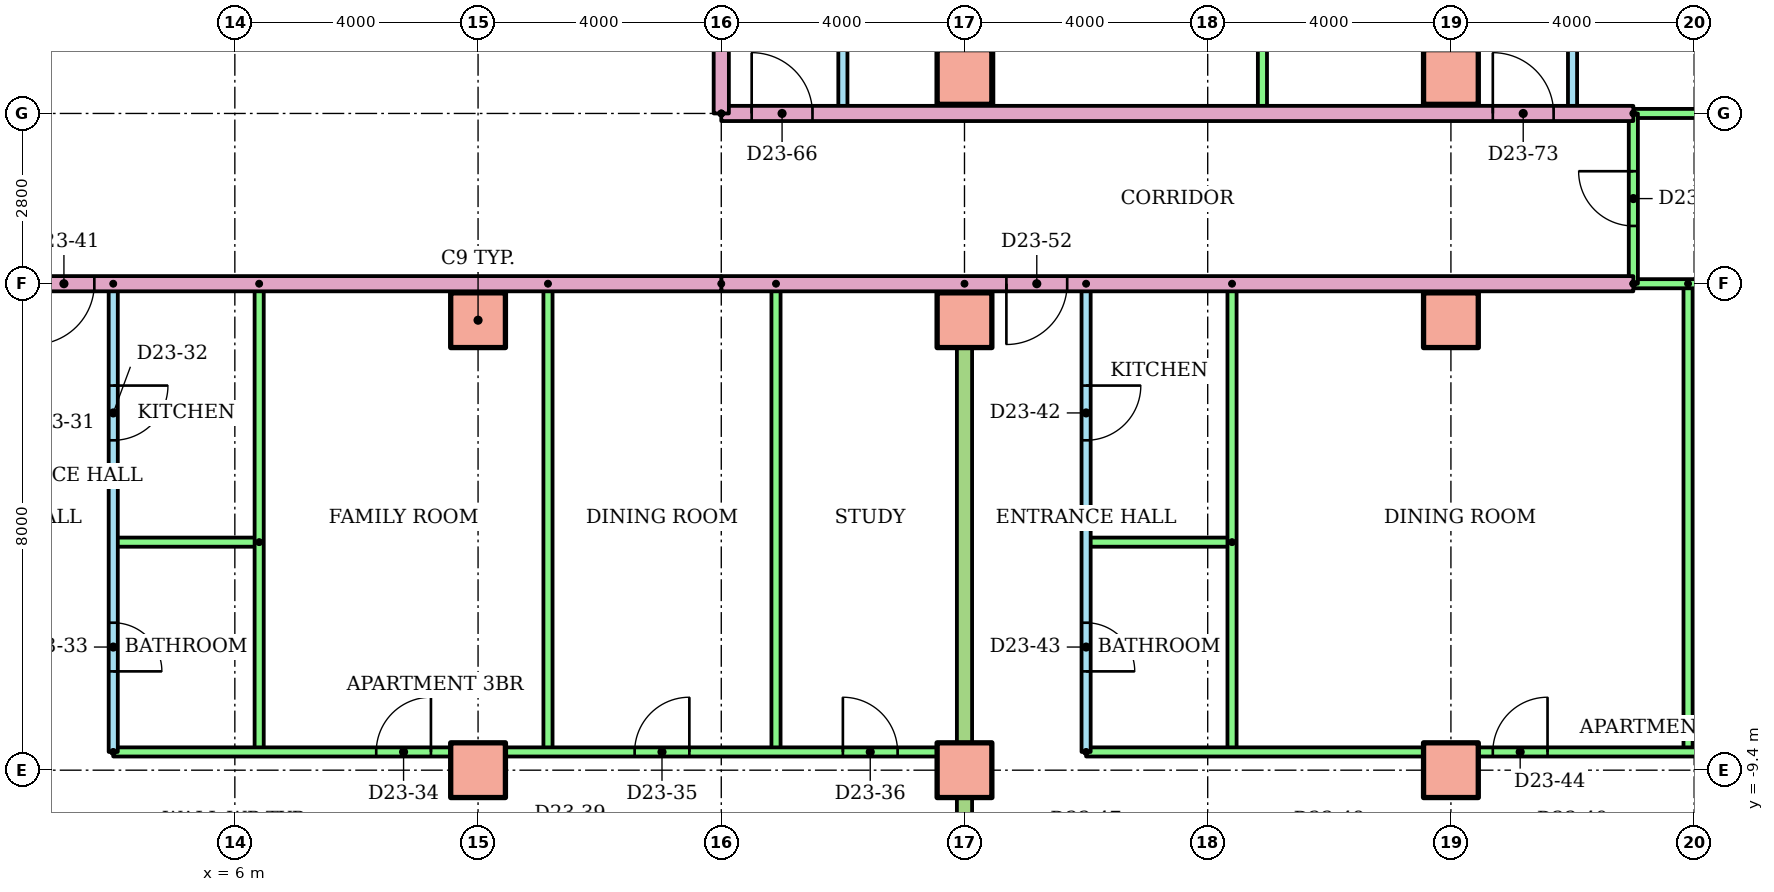
"""IFC4 building model, lengths in metres.
Left out: names, types, materials, properties, quantities, classifications, styles, units other than length and angle.
Written with IfcOpenShell. Run it as: python <this file> out.ifc"""

import sys

from ifc_helpers import new_model, si_unit, direction, frame, frame_2d, origin, origin_2d, place, context, subcontext, project, spatial, rectangle, extrude, element, fill, save


model = new_model("IFC4")
c1 = context("Model", 3, precision=1e-05, world=origin(), true_north=direction((0.0, 1.0)))
c2 = subcontext(c1, "Body", "Model", "MODEL_VIEW")
j1 = project(units=[si_unit("LENGTHUNIT", "METRE"), si_unit("PLANEANGLEUNIT", "RADIAN")], contexts=[c1])
p1 = place(None, origin())
s1 = spatial("IfcSite", under=j1, at=p1, CompositionType="ELEMENT")
p2 = place(p1, origin())
s2 = spatial("IfcBuilding", under=s1, at=p2, CompositionType="ELEMENT")
p3 = place(p2, frame((0.0, 0.0, 90.3)))
s3 = spatial("IfcBuildingStorey", under=s2, at=p3, CompositionType="ELEMENT", Elevation=90.3)
for number, where in (
    (1, (10.0, -9.4, 0.0)),
    (2, (18.0, -9.4, 0.0)),
    (3, (26.0, -9.4, 0.0)),
    (4, (10.0, -2.0, 0.0)),
    (5, (18.0, -2.0, 0.0)),
    (6, (26.0, -2.0, 0.0)),
    (7, (18.0, 2.0, 0.0)),
    (8, (26.0, 2.0, 0.0)),
):
    element("IfcColumn", number, at=place(p3, frame(where)), inside=s3, PredefinedType="COLUMN", context=c2, shape_type="SweptSolid", body=[
        extrude(rectangle(XDim=0.9, YDim=0.9, at=origin_2d()), origin(), (0.0, 0.0, 1.0), 3.2),
    ])
p4 = place(p3, frame((4.0, -1.4, 0.0), z_axis=(0.0, 0.0, 1.0), x_axis=(0.0, -1.0, 0.0)))
e9 = element("IfcWall", 9, at=p4, inside=s3, PredefinedType="PARTITIONING", context=c2, shape_type="SweptSolid", body=[
    extrude(rectangle(XDim=7.7, YDim=0.15, at=frame_2d((3.85, 0.0))), origin(), (0.0, 0.0, 1.0), 2.4),
])
p5 = place(p4, frame((1.675, 0.0, 0.0)))
e10 = element("IfcOpeningElement", 10, at=p5, cuts=e9, PredefinedType="OPENING", context=c2, shape_type="SweptSolid", body=[
    extrude(rectangle(XDim=0.9, YDim=2.1, at=frame_2d((0.45, 1.05))), frame((0.0, 0.085, 0.0), z_axis=(0.0, -1.0, 0.0), x_axis=(1.0, 0.0, 0.0)), (0.0, 0.0, 1.0), 0.17),
])
p6 = place(p4, frame((5.575, 0.0, 0.0)))
e11 = element("IfcOpeningElement", 11, at=p6, cuts=e9, PredefinedType="OPENING", context=c2, shape_type="SweptSolid", body=[
    extrude(rectangle(XDim=0.8, YDim=2.1, at=frame_2d((0.4, 1.05))), frame((0.0, 0.085, 0.0), z_axis=(0.0, -1.0, 0.0), x_axis=(1.0, 0.0, 0.0)), (0.0, 0.0, 1.0), 0.17),
])
p7 = place(p3, frame((6.4, -5.65, 0.0), z_axis=(0.0, 0.0, 1.0), x_axis=(-1.0, 0.0, 0.0)))
e12 = element("IfcWall", 12, at=p7, inside=s3, PredefinedType="PARTITIONING", context=c2, shape_type="SweptSolid", body=[
    extrude(rectangle(XDim=2.4, YDim=0.15, at=frame_2d((1.2, 0.0))), origin(), (0.0, 0.0, 1.0), 2.4),
])
for number, where, z_axis, x_axis in (
    (13, (6.4, -1.4, 0.0), (0.0, 0.0, 1.0), (0.0, -1.0, 0.0)),
    (14, (11.15, -1.4, 0.0), (0.0, 0.0, 1.0), (0.0, -1.0, 0.0)),
    (15, (14.9, -1.4, 0.0), (0.0, 0.0, 1.0), (0.0, -1.0, 0.0)),
):
    element("IfcWall", number, at=place(p3, frame(where, z_axis=z_axis, x_axis=x_axis)), inside=s3, PredefinedType="PARTITIONING", context=c2, shape_type="SweptSolid", body=[
        extrude(rectangle(XDim=7.7, YDim=0.15, at=frame_2d((3.85, 0.0))), origin(), (0.0, 0.0, 1.0), 2.4),
    ])
p8 = place(p3, frame((4.0, -9.1, 0.0)))
e16 = element("IfcWall", 16, at=p8, inside=s3, PredefinedType="PARTITIONING", context=c2, shape_type="SweptSolid", body=[
    extrude(rectangle(XDim=14.0, YDim=0.15, at=frame_2d((7.0, 0.0))), origin(), (0.0, 0.0, 1.0), 2.4),
])
p9 = place(p8, frame((4.325, 0.0, 0.0)))
e17 = element("IfcOpeningElement", 17, at=p9, cuts=e16, PredefinedType="OPENING", context=c2, shape_type="SweptSolid", body=[
    extrude(rectangle(XDim=0.9, YDim=2.1, at=frame_2d((0.45, 1.05))), frame((0.0, 0.085, 0.0), z_axis=(0.0, -1.0, 0.0), x_axis=(1.0, 0.0, 0.0)), (0.0, 0.0, 1.0), 0.17),
])
p10 = place(p8, frame((8.575, 0.0, 0.0)))
e18 = element("IfcOpeningElement", 18, at=p10, cuts=e16, PredefinedType="OPENING", context=c2, shape_type="SweptSolid", body=[
    extrude(rectangle(XDim=0.9, YDim=2.1, at=frame_2d((0.45, 1.05))), frame((0.0, 0.085, 0.0), z_axis=(0.0, -1.0, 0.0), x_axis=(1.0, 0.0, 0.0)), (0.0, 0.0, 1.0), 0.17),
])
p11 = place(p8, frame((12.0, 0.0, 0.0)))
e19 = element("IfcOpeningElement", 19, at=p11, cuts=e16, PredefinedType="OPENING", context=c2, shape_type="SweptSolid", body=[
    extrude(rectangle(XDim=0.9, YDim=2.1, at=frame_2d((0.45, 1.05))), frame((0.0, 0.085, 0.0), z_axis=(0.0, -1.0, 0.0), x_axis=(1.0, 0.0, 0.0)), (0.0, 0.0, 1.0), 0.17),
])
p12 = place(p3, frame((20.0, -1.4, 0.0), z_axis=(0.0, 0.0, 1.0), x_axis=(0.0, -1.0, 0.0)))
e20 = element("IfcWall", 20, at=p12, inside=s3, PredefinedType="PARTITIONING", context=c2, shape_type="SweptSolid", body=[
    extrude(rectangle(XDim=7.7, YDim=0.15, at=frame_2d((3.85, 0.0))), origin(), (0.0, 0.0, 1.0), 2.4),
])
p13 = place(p12, frame((1.675, 0.0, 0.0)))
e21 = element("IfcOpeningElement", 21, at=p13, cuts=e20, PredefinedType="OPENING", context=c2, shape_type="SweptSolid", body=[
    extrude(rectangle(XDim=0.9, YDim=2.1, at=frame_2d((0.45, 1.05))), frame((0.0, 0.085, 0.0), z_axis=(0.0, -1.0, 0.0), x_axis=(1.0, 0.0, 0.0)), (0.0, 0.0, 1.0), 0.17),
])
p14 = place(p12, frame((5.575, 0.0, 0.0)))
e22 = element("IfcOpeningElement", 22, at=p14, cuts=e20, PredefinedType="OPENING", context=c2, shape_type="SweptSolid", body=[
    extrude(rectangle(XDim=0.8, YDim=2.1, at=frame_2d((0.4, 1.05))), frame((0.0, 0.085, 0.0), z_axis=(0.0, -1.0, 0.0), x_axis=(1.0, 0.0, 0.0)), (0.0, 0.0, 1.0), 0.17),
])
p15 = place(p3, frame((22.4, -5.65, 0.0), z_axis=(0.0, 0.0, 1.0), x_axis=(-1.0, 0.0, 0.0)))
e23 = element("IfcWall", 23, at=p15, inside=s3, PredefinedType="PARTITIONING", context=c2, shape_type="SweptSolid", body=[
    extrude(rectangle(XDim=2.4, YDim=0.15, at=frame_2d((1.2, 0.0))), origin(), (0.0, 0.0, 1.0), 2.4),
])
for number, where, z_axis, x_axis in (
    (24, (22.4, -1.4, 0.0), (0.0, 0.0, 1.0), (0.0, -1.0, 0.0)),
    (25, (29.9, -1.4, 0.0), (0.0, 0.0, 1.0), (0.0, -1.0, 0.0)),
):
    element("IfcWall", number, at=place(p3, frame(where, z_axis=z_axis, x_axis=x_axis)), inside=s3, PredefinedType="PARTITIONING", context=c2, shape_type="SweptSolid", body=[
        extrude(rectangle(XDim=7.7, YDim=0.15, at=frame_2d((3.85, 0.0))), origin(), (0.0, 0.0, 1.0), 2.4),
    ])
p16 = place(p3, frame((20.0, -9.1, 0.0)))
e26 = element("IfcWall", 26, at=p16, inside=s3, PredefinedType="PARTITIONING", context=c2, shape_type="SweptSolid", body=[
    extrude(rectangle(XDim=20.62, YDim=0.15, at=frame_2d((10.31, 0.0))), origin(), (0.0, 0.0, 1.0), 2.4),
])
p17 = place(p16, frame((6.689, 0.0, 0.0)))
e27 = element("IfcOpeningElement", 27, at=p17, cuts=e26, PredefinedType="OPENING", context=c2, shape_type="SweptSolid", body=[
    extrude(rectangle(XDim=0.9, YDim=2.1, at=frame_2d((0.45, 1.05))), frame((0.0, 0.085, 0.0), z_axis=(0.0, -1.0, 0.0), x_axis=(1.0, 0.0, 0.0)), (0.0, 0.0, 1.0), 0.17),
])
p18 = place(p16, frame((12.411, 0.0, 0.0)))
e28 = element("IfcOpeningElement", 28, at=p18, cuts=e26, PredefinedType="OPENING", context=c2, shape_type="SweptSolid", body=[
    extrude(rectangle(XDim=0.9, YDim=2.1, at=frame_2d((0.45, 1.05))), frame((0.0, 0.085, 0.0), z_axis=(0.0, -1.0, 0.0), x_axis=(1.0, 0.0, 0.0)), (0.0, 0.0, 1.0), 0.17),
])
p19 = place(p16, frame((17.7, 0.0, 0.0)))
e29 = element("IfcOpeningElement", 29, at=p19, cuts=e26, PredefinedType="OPENING", context=c2, shape_type="SweptSolid", body=[
    extrude(rectangle(XDim=0.9, YDim=2.1, at=frame_2d((0.45, 1.05))), frame((0.0, 0.085, 0.0), z_axis=(0.0, -1.0, 0.0), x_axis=(1.0, 0.0, 0.0)), (0.0, 0.0, 1.0), 0.17),
])
p20 = place(p3, frame((18.0, -1.4, 0.0), z_axis=(0.0, 0.0, 1.0), x_axis=(0.0, -1.0, 0.0)))
e30 = element("IfcWall", 30, at=p20, inside=s3, PredefinedType="PARTITIONING", context=c2, shape_type="SweptSolid", body=[
    extrude(rectangle(XDim=14.81, YDim=0.25, at=frame_2d((7.405, 0.0))), origin(), (0.0, 0.0, 1.0), 2.4),
])
p21 = place(p3, frame((29.0, -1.4, 0.0), z_axis=(0.0, 0.0, 1.0), x_axis=(-1.0, 0.0, 0.0)))
e31 = element("IfcWall", 31, at=p21, inside=s3, PredefinedType="PARTITIONING", context=c2, shape_type="SweptSolid", body=[
    extrude(rectangle(XDim=15.0, YDim=0.25, at=frame_2d((7.5, 0.0))), origin(), (0.0, 0.0, 1.0), 2.4),
])
p22 = place(p21, frame((9.311, 0.0, 0.0)))
e32 = element("IfcOpeningElement", 32, at=p22, cuts=e31, PredefinedType="OPENING", context=c2, shape_type="SweptSolid", body=[
    extrude(rectangle(XDim=1.0, YDim=2.1, at=frame_2d((0.5, 1.05))), frame((0.0, 0.135, 0.0), z_axis=(0.0, -1.0, 0.0), x_axis=(1.0, 0.0, 0.0)), (0.0, 0.0, 1.0), 0.27),
])
p23 = place(p3, frame((40.62, -1.4, 0.0), z_axis=(0.0, 0.0, 1.0), x_axis=(-1.0, 0.0, 0.0)))
e33 = element("IfcWall", 33, at=p23, inside=s3, PredefinedType="PARTITIONING", context=c2, shape_type="SweptSolid", body=[
    extrude(rectangle(XDim=11.62, YDim=0.15, at=frame_2d((5.81, 0.0))), origin(), (0.0, 0.0, 1.0), 2.4),
])
p24 = place(p3, frame((16.0, 11.5, 0.0), z_axis=(0.0, 0.0, 1.0), x_axis=(0.0, -1.0, 0.0)))
e34 = element("IfcWall", 34, at=p24, inside=s3, PredefinedType="PARTITIONING", context=c2, shape_type="SweptSolid", body=[
    extrude(rectangle(XDim=10.1, YDim=0.15, at=frame_2d((5.05, 0.0))), origin(), (0.0, 0.0, 1.0), 2.4),
])
p25 = place(p24, frame((6.9, 0.0, 0.0)))
e35 = element("IfcOpeningElement", 35, at=p25, cuts=e34, PredefinedType="OPENING", context=c2, shape_type="SweptSolid", body=[
    extrude(rectangle(XDim=0.9, YDim=2.1, at=frame_2d((0.45, 1.05))), frame((0.0, 0.085, 0.0), z_axis=(0.0, -1.0, 0.0), x_axis=(1.0, 0.0, 0.0)), (0.0, 0.0, 1.0), 0.17),
])
p26 = place(p24, frame((1.9, 0.0, 0.0)))
e36 = element("IfcOpeningElement", 36, at=p26, cuts=e34, PredefinedType="OPENING", context=c2, shape_type="SweptSolid", body=[
    extrude(rectangle(XDim=0.8, YDim=2.1, at=frame_2d((0.4, 1.05))), frame((0.0, 0.085, 0.0), z_axis=(0.0, -1.0, 0.0), x_axis=(1.0, 0.0, 0.0)), (0.0, 0.0, 1.0), 0.17),
])
for number, where, z_axis, x_axis in (
    (37, (18.4, 11.5, 0.0), (0.0, 0.0, 1.0), (0.0, -1.0, 0.0)),
    (38, (22.9, 11.5, 0.0), (0.0, 0.0, 1.0), (0.0, -1.0, 0.0)),
):
    element("IfcWall", number, at=place(p3, frame(where, z_axis=z_axis, x_axis=x_axis)), inside=s3, PredefinedType="PARTITIONING", context=c2, shape_type="SweptSolid", body=[
        extrude(rectangle(XDim=10.1, YDim=0.15, at=frame_2d((5.05, 0.0))), origin(), (0.0, 0.0, 1.0), 2.4),
    ])
p27 = place(p3, frame((28.0, 11.5, 0.0), z_axis=(0.0, 0.0, 1.0), x_axis=(0.0, -1.0, 0.0)))
e39 = element("IfcWall", 39, at=p27, inside=s3, PredefinedType="PARTITIONING", context=c2, shape_type="SweptSolid", body=[
    extrude(rectangle(XDim=10.1, YDim=0.15, at=frame_2d((5.05, 0.0))), origin(), (0.0, 0.0, 1.0), 2.4),
])
p28 = place(p27, frame((6.9, 0.0, 0.0)))
e40 = element("IfcOpeningElement", 40, at=p28, cuts=e39, PredefinedType="OPENING", context=c2, shape_type="SweptSolid", body=[
    extrude(rectangle(XDim=0.9, YDim=2.1, at=frame_2d((0.45, 1.05))), frame((0.0, 0.085, 0.0), z_axis=(0.0, -1.0, 0.0), x_axis=(1.0, 0.0, 0.0)), (0.0, 0.0, 1.0), 0.17),
])
p29 = place(p27, frame((1.9, 0.0, 0.0)))
e41 = element("IfcOpeningElement", 41, at=p29, cuts=e39, PredefinedType="OPENING", context=c2, shape_type="SweptSolid", body=[
    extrude(rectangle(XDim=0.8, YDim=2.1, at=frame_2d((0.4, 1.05))), frame((0.0, 0.085, 0.0), z_axis=(0.0, -1.0, 0.0), x_axis=(1.0, 0.0, 0.0)), (0.0, 0.0, 1.0), 0.17),
])
p30 = place(p3, frame((26.0, 18.621, 0.0), z_axis=(0.0, 0.0, 1.0), x_axis=(0.0, -1.0, 0.0)))
e42 = element("IfcWall", 42, at=p30, inside=s3, PredefinedType="PARTITIONING", context=c2, shape_type="SweptSolid", body=[
    extrude(rectangle(XDim=17.221, YDim=0.25, at=frame_2d((8.611, 0.0))), origin(), (0.0, 0.0, 1.0), 2.4),
])
p31 = place(p3, frame((14.0, 1.4, 0.0)))
e43 = element("IfcWall", 43, at=p31, inside=s3, PredefinedType="PARTITIONING", context=c2, shape_type="SweptSolid", body=[
    extrude(rectangle(XDim=15.0, YDim=0.25, at=frame_2d((7.5, 0.0))), origin(), (0.0, 0.0, 1.0), 2.4),
])
p32 = place(p31, frame((0.5, 0.0, 0.0)))
e44 = element("IfcOpeningElement", 44, at=p32, cuts=e43, PredefinedType="OPENING", context=c2, shape_type="SweptSolid", body=[
    extrude(rectangle(XDim=1.0, YDim=2.1, at=frame_2d((0.5, 1.05))), frame((0.0, 0.135, 0.0), z_axis=(0.0, -1.0, 0.0), x_axis=(1.0, 0.0, 0.0)), (0.0, 0.0, 1.0), 0.27),
])
p33 = place(p31, frame((12.689, 0.0, 0.0)))
e45 = element("IfcOpeningElement", 45, at=p33, cuts=e43, PredefinedType="OPENING", context=c2, shape_type="SweptSolid", body=[
    extrude(rectangle(XDim=1.0, YDim=2.1, at=frame_2d((0.5, 1.05))), frame((0.0, 0.135, 0.0), z_axis=(0.0, -1.0, 0.0), x_axis=(1.0, 0.0, 0.0)), (0.0, 0.0, 1.0), 0.27),
])
p34 = place(p3, frame((29.0, 1.4, 0.0)))
e46 = element("IfcWall", 46, at=p34, inside=s3, PredefinedType="PARTITIONING", context=c2, shape_type="SweptSolid", body=[
    extrude(rectangle(XDim=11.62, YDim=0.15, at=frame_2d((5.81, 0.0))), origin(), (0.0, 0.0, 1.0), 2.4),
])
p35 = place(p3, frame((29.0, -1.4, 0.0), z_axis=(0.0, 0.0, 1.0), x_axis=(0.0, 1.0, 0.0)))
e47 = element("IfcWall", 47, at=p35, inside=s3, PredefinedType="PARTITIONING", context=c2, shape_type="SweptSolid", body=[
    extrude(rectangle(XDim=2.8, YDim=0.15, at=frame_2d((1.4, 0.0))), origin(), (0.0, 0.0, 1.0), 2.4),
])
p36 = place(p35, frame((0.95, 0.0, 0.0)))
e48 = element("IfcOpeningElement", 48, at=p36, cuts=e47, PredefinedType="OPENING", context=c2, shape_type="SweptSolid", body=[
    extrude(rectangle(XDim=0.9, YDim=2.1, at=frame_2d((0.45, 1.05))), frame((0.0, 0.085, 0.0), z_axis=(0.0, -1.0, 0.0), x_axis=(1.0, 0.0, 0.0)), (0.0, 0.0, 1.0), 0.17),
])
p37 = place(p3, frame((14.0, -1.4, 0.0), z_axis=(0.0, 0.0, 1.0), x_axis=(-1.0, 0.0, 0.0)))
e49 = element("IfcWall", 49, at=p37, inside=s3, PredefinedType="PARTITIONING", context=c2, shape_type="SweptSolid", body=[
    extrude(rectangle(XDim=28.0, YDim=0.25, at=frame_2d((14.0, 0.0))), origin(), (0.0, 0.0, 1.0), 2.4),
])
p38 = place(p37, frame((12.689, 0.0, 0.0)))
e50 = element("IfcOpeningElement", 50, at=p38, cuts=e49, PredefinedType="OPENING", context=c2, shape_type="SweptSolid", body=[
    extrude(rectangle(XDim=1.0, YDim=2.1, at=frame_2d((0.5, 1.05))), frame((0.0, 0.135, 0.0), z_axis=(0.0, -1.0, 0.0), x_axis=(1.0, 0.0, 0.0)), (0.0, 0.0, 1.0), 0.27),
])
p39 = place(p37, frame((10.311, 0.0, 0.0)))
e51 = element("IfcOpeningElement", 51, at=p39, cuts=e49, PredefinedType="OPENING", context=c2, shape_type="SweptSolid", body=[
    extrude(rectangle(XDim=1.0, YDim=2.1, at=frame_2d((0.5, 1.05))), frame((0.0, 0.135, 0.0), z_axis=(0.0, -1.0, 0.0), x_axis=(1.0, 0.0, 0.0)), (0.0, 0.0, 1.0), 0.27),
])
p40 = place(p3, frame((14.0, 1.4, 0.0), z_axis=(0.0, 0.0, 1.0), x_axis=(0.0, 1.0, 0.0)))
e52 = element("IfcWall", 52, at=p40, inside=s3, PredefinedType="PARTITIONING", context=c2, shape_type="SweptSolid", body=[
    extrude(rectangle(XDim=1.6, YDim=0.25, at=frame_2d((0.8, 0.0))), origin(), (0.0, 0.0, 1.0), 2.4),
])
p41 = place(p5, origin())
e53 = element("IfcDoor", 53, at=p41, inside=s3, OperationType="SINGLE_SWING_LEFT", PredefinedType="DOOR", context=c2, shape_type="SweptSolid", body=[
    extrude(rectangle(XDim=0.9, YDim=2.1, at=frame_2d((0.45, 1.05))), frame((0.0, 0.025, 0.0), z_axis=(0.0, -1.0, 0.0), x_axis=(1.0, 0.0, 0.0)), (0.0, 0.0, 1.0), 0.05),
])
fill(e10, e53)
p42 = place(p6, origin())
e54 = element("IfcDoor", 54, at=p42, inside=s3, OperationType="SINGLE_SWING_RIGHT", PredefinedType="DOOR", context=c2, shape_type="SweptSolid", body=[
    extrude(rectangle(XDim=0.8, YDim=2.1, at=frame_2d((0.4, 1.05))), frame((0.0, 0.025, 0.0), z_axis=(0.0, -1.0, 0.0), x_axis=(1.0, 0.0, 0.0)), (0.0, 0.0, 1.0), 0.05),
])
fill(e11, e54)
p43 = place(p9, origin())
e55 = element("IfcDoor", 55, at=p43, inside=s3, OperationType="SINGLE_SWING_RIGHT", PredefinedType="DOOR", context=c2, shape_type="SweptSolid", body=[
    extrude(rectangle(XDim=0.9, YDim=2.1, at=frame_2d((0.45, 1.05))), frame((0.0, 0.025, 0.0), z_axis=(0.0, -1.0, 0.0), x_axis=(1.0, 0.0, 0.0)), (0.0, 0.0, 1.0), 0.05),
])
fill(e17, e55)
p44 = place(p10, origin())
e56 = element("IfcDoor", 56, at=p44, inside=s3, OperationType="SINGLE_SWING_RIGHT", PredefinedType="DOOR", context=c2, shape_type="SweptSolid", body=[
    extrude(rectangle(XDim=0.9, YDim=2.1, at=frame_2d((0.45, 1.05))), frame((0.0, 0.025, 0.0), z_axis=(0.0, -1.0, 0.0), x_axis=(1.0, 0.0, 0.0)), (0.0, 0.0, 1.0), 0.05),
])
fill(e18, e56)
p45 = place(p11, origin())
e57 = element("IfcDoor", 57, at=p45, inside=s3, OperationType="SINGLE_SWING_LEFT", PredefinedType="DOOR", context=c2, shape_type="SweptSolid", body=[
    extrude(rectangle(XDim=0.9, YDim=2.1, at=frame_2d((0.45, 1.05))), frame((0.0, 0.025, 0.0), z_axis=(0.0, -1.0, 0.0), x_axis=(1.0, 0.0, 0.0)), (0.0, 0.0, 1.0), 0.05),
])
fill(e19, e57)
p46 = place(p39, origin())
e58 = element("IfcDoor", 58, at=p46, inside=s3, OperationType="SINGLE_SWING_RIGHT", PredefinedType="DOOR", context=c2, shape_type="SweptSolid", body=[
    extrude(rectangle(XDim=1.0, YDim=2.1, at=frame_2d((0.5, 1.05))), frame((0.0, 0.025, 0.0), z_axis=(0.0, -1.0, 0.0), x_axis=(1.0, 0.0, 0.0)), (0.0, 0.0, 1.0), 0.05),
])
fill(e51, e58)
p47 = place(p13, origin())
e59 = element("IfcDoor", 59, at=p47, inside=s3, OperationType="SINGLE_SWING_LEFT", PredefinedType="DOOR", context=c2, shape_type="SweptSolid", body=[
    extrude(rectangle(XDim=0.9, YDim=2.1, at=frame_2d((0.45, 1.05))), frame((0.0, 0.025, 0.0), z_axis=(0.0, -1.0, 0.0), x_axis=(1.0, 0.0, 0.0)), (0.0, 0.0, 1.0), 0.05),
])
fill(e21, e59)
p48 = place(p14, origin())
e60 = element("IfcDoor", 60, at=p48, inside=s3, OperationType="SINGLE_SWING_RIGHT", PredefinedType="DOOR", context=c2, shape_type="SweptSolid", body=[
    extrude(rectangle(XDim=0.8, YDim=2.1, at=frame_2d((0.4, 1.05))), frame((0.0, 0.025, 0.0), z_axis=(0.0, -1.0, 0.0), x_axis=(1.0, 0.0, 0.0)), (0.0, 0.0, 1.0), 0.05),
])
fill(e22, e60)
p49 = place(p17, origin())
e61 = element("IfcDoor", 61, at=p49, inside=s3, OperationType="SINGLE_SWING_RIGHT", PredefinedType="DOOR", context=c2, shape_type="SweptSolid", body=[
    extrude(rectangle(XDim=0.9, YDim=2.1, at=frame_2d((0.45, 1.05))), frame((0.0, 0.025, 0.0), z_axis=(0.0, -1.0, 0.0), x_axis=(1.0, 0.0, 0.0)), (0.0, 0.0, 1.0), 0.05),
])
fill(e27, e61)
p50 = place(p22, origin())
e62 = element("IfcDoor", 62, at=p50, inside=s3, OperationType="SINGLE_SWING_RIGHT", PredefinedType="DOOR", context=c2, shape_type="SweptSolid", body=[
    extrude(rectangle(XDim=1.0, YDim=2.1, at=frame_2d((0.5, 1.05))), frame((0.0, 0.025, 0.0), z_axis=(0.0, -1.0, 0.0), x_axis=(1.0, 0.0, 0.0)), (0.0, 0.0, 1.0), 0.05),
])
fill(e32, e62)
p51 = place(p32, origin())
e63 = element("IfcDoor", 63, at=p51, inside=s3, OperationType="SINGLE_SWING_LEFT", PredefinedType="DOOR", context=c2, shape_type="SweptSolid", body=[
    extrude(rectangle(XDim=1.0, YDim=2.1, at=frame_2d((0.5, 1.05))), frame((0.0, 0.025, 0.0), z_axis=(0.0, -1.0, 0.0), x_axis=(1.0, 0.0, 0.0)), (0.0, 0.0, 1.0), 0.05),
])
fill(e44, e63)
p52 = place(p33, origin())
e64 = element("IfcDoor", 64, at=p52, inside=s3, OperationType="SINGLE_SWING_LEFT", PredefinedType="DOOR", context=c2, shape_type="SweptSolid", body=[
    extrude(rectangle(XDim=1.0, YDim=2.1, at=frame_2d((0.5, 1.05))), frame((0.0, 0.025, 0.0), z_axis=(0.0, -1.0, 0.0), x_axis=(1.0, 0.0, 0.0)), (0.0, 0.0, 1.0), 0.05),
])
fill(e45, e64)
p53 = place(p36, origin())
e65 = element("IfcDoor", 65, at=p53, inside=s3, OperationType="SINGLE_SWING_RIGHT", PredefinedType="DOOR", context=c2, shape_type="SweptSolid", body=[
    extrude(rectangle(XDim=0.9, YDim=2.1, at=frame_2d((0.45, 1.05))), frame((0.0, 0.025, 0.0), z_axis=(0.0, -1.0, 0.0), x_axis=(1.0, 0.0, 0.0)), (0.0, 0.0, 1.0), 0.05),
])
fill(e48, e65)
save(model, sys.argv[1])
